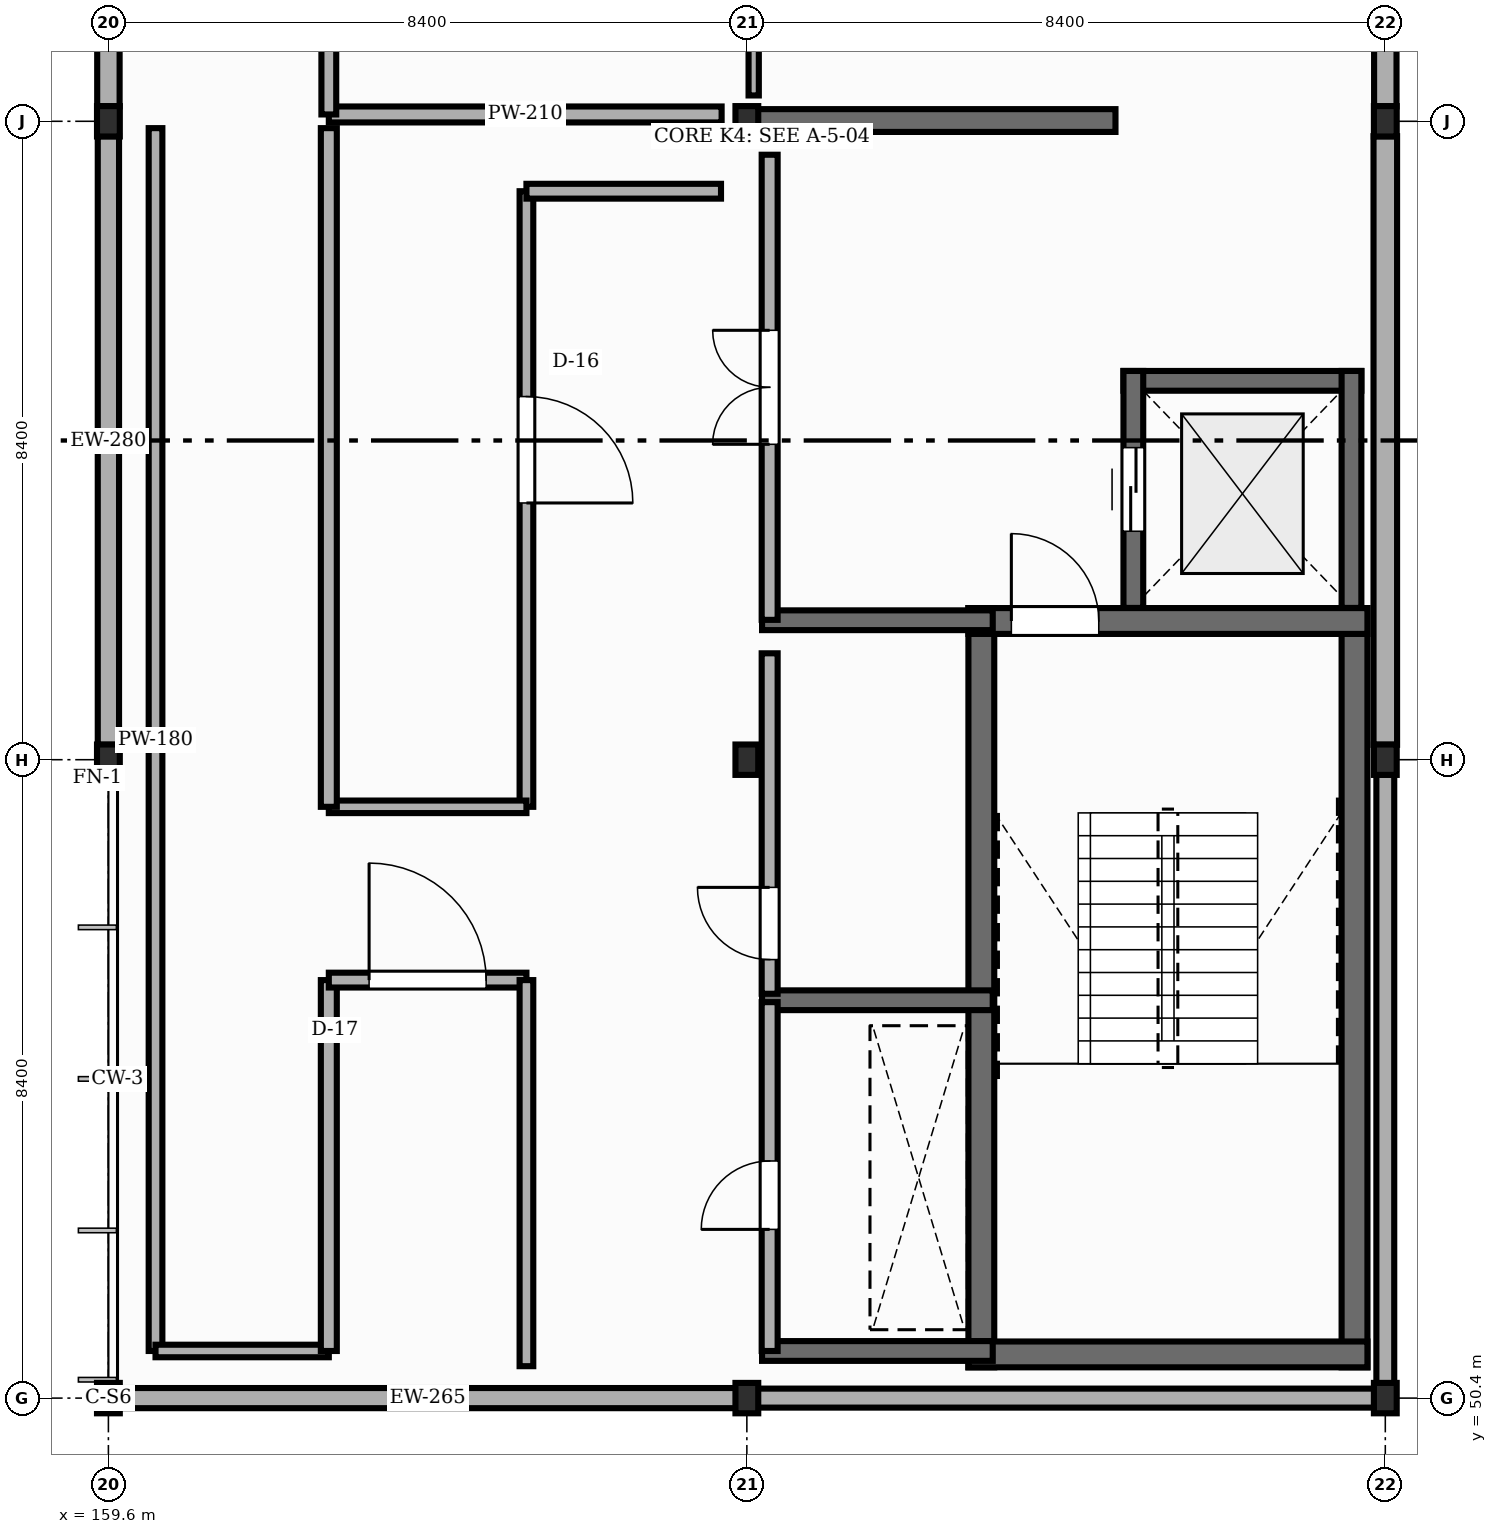
"""IFC4 building model, lengths in metres.
Left out: names, types, materials, properties, quantities, classifications, styles, units other than length and angle.
Written with IfcOpenShell. Run it as: python <this file> out.ifc"""

import sys

from ifc_helpers import new_model, si_unit, direction, frame, frame_2d, origin, origin_2d, place, context, subcontext, project, spatial, rectangle, i_section, extrude, element, fill, save


model = new_model("IFC4")
c1 = context("Model", 3, precision=1e-05, world=origin(), true_north=direction((0.0, 1.0)))
c2 = subcontext(c1, "Body", "Model", "MODEL_VIEW")
j1 = project(units=[si_unit("LENGTHUNIT", "METRE"), si_unit("PLANEANGLEUNIT", "RADIAN")], contexts=[c1])
p1 = place(None, origin())
s1 = spatial("IfcSite", under=j1, at=p1, CompositionType="ELEMENT")
p2 = place(p1, origin())
s2 = spatial("IfcBuilding", under=s1, at=p2, CompositionType="ELEMENT")
p3 = place(p2, frame((0.0, 0.0, 13.95)))
s3 = spatial("IfcBuildingStorey", under=s2, at=p3, CompositionType="ELEMENT", Elevation=13.95)
for number, where, z_axis, x_axis in (
    (1, (159.6, 50.4, 0.0), (0.0, 0.0, 1.0), (1.0, 0.0, 0.0)),
    (2, (159.6, 58.8, 0.0), (0.0, 0.0, 1.0), (1.0, 0.0, 0.0)),
    (3, (159.6, 67.2, 0.0), (0.0, 0.0, 1.0), (1.0, 0.0, 0.0)),
    (4, (168.0, 50.4, 0.0), (0.0, 0.0, 1.0), (1.0, 0.0, 0.0)),
    (5, (168.0, 58.8, 0.0), (0.0, 0.0, 1.0), (1.0, 0.0, 0.0)),
    (6, (168.0, 67.2, 0.0), (0.0, 0.0, 1.0), (1.0, 0.0, 0.0)),
    (7, (176.4, 50.4, 0.0), (0.0, 0.0, 1.0), (1.0, 0.0, 0.0)),
    (8, (176.4, 58.8, 0.0), (0.0, 0.0, 1.0), (1.0, 0.0, 0.0)),
    (9, (176.4, 67.2, 0.0), (0.0, 0.0, 1.0), (1.0, 0.0, 0.0)),
):
    element("IfcColumn", number, at=place(p3, frame(where, z_axis=z_axis, x_axis=x_axis)), inside=s3, PredefinedType="COLUMN", context=c2, shape_type="SweptSolid", body=[
        extrude(i_section(OverallWidth=0.3, OverallDepth=0.4, WebThickness=0.013, FlangeThickness=0.024, FilletRadius=0.027, at=origin_2d()), origin(), (0.0, 0.0, 1.0), 4.05),
    ])
p4 = place(p3, frame((159.6, 75.404, 0.0), z_axis=(0.0, 0.0, 1.0), x_axis=(0.0, -1.0, 0.0)))
e10 = element("IfcWall", 10, at=p4, inside=s3, PredefinedType="STANDARD", context=c2, shape_type="SweptSolid", body=[
    extrude(rectangle(XDim=8.008, YDim=0.295, at=frame_2d((4.004, 0.0))), origin(), (0.0, 0.0, 1.0), 3.577),
])
p5 = place(p3, frame((159.6, 67.004, 0.0), z_axis=(0.0, 0.0, 1.0), x_axis=(0.0, -1.0, 0.0)))
e11 = element("IfcWall", 11, at=p5, inside=s3, PredefinedType="STANDARD", context=c2, shape_type="SweptSolid", body=[
    extrude(rectangle(XDim=8.008, YDim=0.28, at=frame_2d((4.004, 0.0))), origin(), (0.0, 0.0, 1.0), 3.487),
])
p6 = place(p3, frame((159.608, 50.4, 0.0), z_axis=(0.0, 0.0, 1.0), x_axis=(1.0, 0.0, 0.0)))
e12 = element("IfcWall", 12, at=p6, inside=s3, PredefinedType="STANDARD", context=c2, shape_type="SweptSolid", body=[
    extrude(rectangle(XDim=8.384, YDim=0.265, at=frame_2d((4.192, 0.0))), origin(), (0.0, 0.0, 1.0), 3.517),
])
p7 = place(p3, frame((168.008, 50.4, 0.0), z_axis=(0.0, 0.0, 1.0), x_axis=(1.0, 0.0, 0.0)))
e13 = element("IfcWall", 13, at=p7, inside=s3, PredefinedType="STANDARD", context=c2, shape_type="SweptSolid", body=[
    extrude(rectangle(XDim=8.384, YDim=0.25, at=frame_2d((4.192, 0.0))), origin(), (0.0, 0.0, 1.0), 3.487),
])
p8 = place(p3, frame((176.4, 50.596, 0.0), z_axis=(0.0, 0.0, 1.0), x_axis=(0.0, 1.0, 0.0)))
e14 = element("IfcWall", 14, at=p8, inside=s3, PredefinedType="STANDARD", context=c2, shape_type="SweptSolid", body=[
    extrude(rectangle(XDim=8.008, YDim=0.235, at=frame_2d((4.004, 0.0))), origin(), (0.0, 0.0, 1.0), 3.577),
])
p9 = place(p3, frame((176.4, 58.996, 0.0), z_axis=(0.0, 0.0, 1.0), x_axis=(0.0, 1.0, 0.0)))
e15 = element("IfcWall", 15, at=p9, inside=s3, PredefinedType="STANDARD", context=c2, shape_type="SweptSolid", body=[
    extrude(rectangle(XDim=8.008, YDim=0.31, at=frame_2d((4.004, 0.0))), origin(), (0.0, 0.0, 1.0), 3.487),
])
p10 = place(p3, frame((176.4, 67.396, 0.0), z_axis=(0.0, 0.0, 1.0), x_axis=(0.0, 1.0, 0.0)))
e16 = element("IfcWall", 16, at=p10, inside=s3, PredefinedType="STANDARD", context=c2, shape_type="SweptSolid", body=[
    extrude(rectangle(XDim=8.008, YDim=0.295, at=frame_2d((4.004, 0.0))), origin(), (0.0, 0.0, 1.0), 3.577),
])
for number, where, z_axis, x_axis in (
    (17, (171.085, 50.805, 0.0), (0.0, 0.0, 1.0), (0.0, 1.0, 0.0)),
    (18, (175.995, 50.805, 0.0), (0.0, 0.0, 1.0), (0.0, 1.0, 0.0)),
):
    element("IfcWall", number, at=place(p3, frame(where, z_axis=z_axis, x_axis=x_axis)), inside=s3, PredefinedType="SHEAR", context=c2, shape_type="SweptSolid", body=[
        extrude(rectangle(XDim=9.99, YDim=0.34, at=frame_2d((4.995, 0.0))), origin(), (0.0, 0.0, 1.0), 3.85),
    ])
p11 = place(p3, frame((170.915, 50.975, 0.0), z_axis=(0.0, 0.0, 1.0), x_axis=(1.0, 0.0, 0.0)))
e19 = element("IfcWall", 19, at=p11, inside=s3, PredefinedType="SHEAR", context=c2, shape_type="SweptSolid", body=[
    extrude(rectangle(XDim=5.25, YDim=0.34, at=frame_2d((2.625, 0.0))), origin(), (0.0, 0.0, 1.0), 3.85),
])
p12 = place(p3, frame((170.915, 60.625, 0.0), z_axis=(0.0, 0.0, 1.0), x_axis=(1.0, 0.0, 0.0)))
e20 = element("IfcWall", 20, at=p12, inside=s3, PredefinedType="SHEAR", context=c2, shape_type="SweptSolid", body=[
    extrude(rectangle(XDim=5.25, YDim=0.34, at=frame_2d((2.625, 0.0))), origin(), (0.0, 0.0, 1.0), 3.85),
])
p13 = place(p12, frame((0.565, 0.0, 0.0)))
e21 = element("IfcOpeningElement", 21, at=p13, cuts=e20, PredefinedType="OPENING", context=c2, shape_type="SweptSolid", body=[
    extrude(rectangle(XDim=1.15, YDim=2.15, at=frame_2d((0.575, 1.075))), frame((0.0, 0.18, 0.0), z_axis=(0.0, -1.0, 0.0), x_axis=(1.0, 0.0, 0.0)), (0.0, 0.0, 1.0), 0.36),
])
p14 = place(p3, frame((172.955, 63.785, 0.0), z_axis=(0.0, 0.0, 1.0), x_axis=(1.0, 0.0, 0.0)))
e22 = element("IfcWall", 22, at=p14, inside=s3, PredefinedType="SHEAR", context=c2, shape_type="SweptSolid", body=[
    extrude(rectangle(XDim=3.13, YDim=0.26, at=frame_2d((1.565, 0.0))), origin(), (0.0, 0.0, 1.0), 3.85),
])
p15 = place(p3, frame((175.955, 60.797, 0.0), z_axis=(0.0, 0.0, 1.0), x_axis=(0.0, 1.0, 0.0)))
e23 = element("IfcWall", 23, at=p15, inside=s3, PredefinedType="SHEAR", context=c2, shape_type="SweptSolid", body=[
    extrude(rectangle(XDim=3.118, YDim=0.26, at=frame_2d((1.559, 0.0))), origin(), (0.0, 0.0, 1.0), 3.85),
])
p16 = place(p3, frame((173.085, 60.797, 0.0), z_axis=(0.0, 0.0, 1.0), x_axis=(0.0, 1.0, 0.0)))
e24 = element("IfcWall", 24, at=p16, inside=s3, PredefinedType="SHEAR", context=c2, shape_type="SweptSolid", body=[
    extrude(rectangle(XDim=3.118, YDim=0.26, at=frame_2d((1.559, 0.0))), origin(), (0.0, 0.0, 1.0), 3.85),
])
p17 = place(p16, frame((1.009, 0.0, 0.0)))
e25 = element("IfcOpeningElement", 25, at=p17, cuts=e24, PredefinedType="OPENING", context=c2, shape_type="SweptSolid", body=[
    extrude(rectangle(XDim=1.1, YDim=2.15, at=frame_2d((0.55, 1.075))), frame((0.0, 0.14, 0.0), z_axis=(0.0, -1.0, 0.0), x_axis=(1.0, 0.0, 0.0)), (0.0, 0.0, 1.0), 0.28),
])
for number, where, z_axis, x_axis in (
    (26, (168.2, 51.02, 0.0), (0.0, 0.0, 1.0), (1.0, 0.0, 0.0)),
    (27, (168.2, 55.635, 0.0), (0.0, 0.0, 1.0), (1.0, 0.0, 0.0)),
    (28, (168.2, 60.635, 0.0), (0.0, 0.0, 1.0), (1.0, 0.0, 0.0)),
):
    element("IfcWall", number, at=place(p3, frame(where, z_axis=z_axis, x_axis=x_axis)), inside=s3, PredefinedType="SHEAR", context=c2, shape_type="SweptSolid", body=[
        extrude(rectangle(XDim=3.035, YDim=0.26, at=frame_2d((1.518, 0.0))), origin(), (0.0, 0.0, 1.0), 3.85),
    ])
p18 = place(p3, frame((167.98, 67.21, 0.0), z_axis=(0.0, 0.0, 1.0), x_axis=(1.0, 0.0, 0.0)))
e29 = element("IfcWall", 29, at=p18, inside=s3, PredefinedType="SHEAR", context=c2, shape_type="SweptSolid", body=[
    extrude(rectangle(XDim=4.87, YDim=0.3, at=frame_2d((2.435, 0.0))), origin(), (0.0, 0.0, 1.0), 3.85),
])
p19 = place(p3, frame((168.3, 51.02, 0.0), z_axis=(0.0, 0.0, 1.0), x_axis=(0.0, 1.0, 0.0)))
e30 = element("IfcWall", 30, at=p19, inside=s3, PredefinedType="STANDARD", context=c2, shape_type="SweptSolid", body=[
    extrude(rectangle(XDim=4.59, YDim=0.21, at=frame_2d((2.295, 0.0))), origin(), (0.0, 0.0, 1.0), 3.357),
])
p20 = place(p19, frame((1.6, 0.0, 0.0)))
e31 = element("IfcOpeningElement", 31, at=p20, cuts=e30, PredefinedType="OPENING", context=c2, shape_type="SweptSolid", body=[
    extrude(rectangle(XDim=0.9, YDim=2.1, at=frame_2d((0.45, 1.05))), frame((0.0, 0.115, 0.0), z_axis=(0.0, -1.0, 0.0), x_axis=(1.0, 0.0, 0.0)), (0.0, 0.0, 1.0), 0.23),
])
p21 = place(p3, frame((168.3, 55.72, 0.0), z_axis=(0.0, 0.0, 1.0), x_axis=(0.0, 1.0, 0.0)))
e32 = element("IfcWall", 32, at=p21, inside=s3, PredefinedType="STANDARD", context=c2, shape_type="SweptSolid", body=[
    extrude(rectangle(XDim=4.48, YDim=0.21, at=frame_2d((2.24, 0.0))), origin(), (0.0, 0.0, 1.0), 3.357),
])
p22 = place(p21, frame((0.45, 0.0, 0.0)))
e33 = element("IfcOpeningElement", 33, at=p22, cuts=e32, PredefinedType="OPENING", context=c2, shape_type="SweptSolid", body=[
    extrude(rectangle(XDim=0.95, YDim=2.15, at=frame_2d((0.475, 1.075))), frame((0.0, 0.115, 0.0), z_axis=(0.0, -1.0, 0.0), x_axis=(1.0, 0.0, 0.0)), (0.0, 0.0, 1.0), 0.23),
])
p23 = place(p3, frame((168.3, 60.64, 0.0), z_axis=(0.0, 0.0, 1.0), x_axis=(0.0, 1.0, 0.0)))
e34 = element("IfcWall", 34, at=p23, inside=s3, PredefinedType="STANDARD", context=c2, shape_type="SweptSolid", body=[
    extrude(rectangle(XDim=6.12, YDim=0.21, at=frame_2d((3.06, 0.0))), origin(), (0.0, 0.0, 1.0), 3.447),
])
p24 = place(p23, frame((2.31, 0.0, 0.0)))
e35 = element("IfcOpeningElement", 35, at=p24, cuts=e34, PredefinedType="OPENING", context=c2, shape_type="SweptSolid", body=[
    extrude(rectangle(XDim=1.5, YDim=2.2, at=frame_2d((0.75, 1.1))), frame((0.0, 0.115, 0.0), z_axis=(0.0, -1.0, 0.0), x_axis=(1.0, 0.0, 0.0)), (0.0, 0.0, 1.0), 0.23),
])
p25 = place(p3, frame((168.09, 67.54, -0.004), z_axis=(0.0, 0.0, 1.0), x_axis=(0.0, 1.0, 0.0)))
e36 = element("IfcWall", 36, at=p25, inside=s3, PredefinedType="STANDARD", context=c2, shape_type="SweptSolid", body=[
    extrude(rectangle(XDim=7.886, YDim=0.135, at=frame_2d((3.943, 0.0))), origin(), (0.0, 0.0, 1.0), 3.501),
])
p26 = place(p3, frame((167.668, 67.29, -0.004), z_axis=(0.0, 0.0, 1.0), x_axis=(-1.0, 0.0, 0.0)))
e37 = element("IfcWall", 37, at=p26, inside=s3, PredefinedType="STANDARD", context=c2, shape_type="SweptSolid", body=[
    extrude(rectangle(XDim=5.168, YDim=0.21, at=frame_2d((2.584, 0.0))), origin(), (0.0, 0.0, 1.0), 3.251),
])
p27 = place(p3, frame((162.5, 67.29, -0.004), z_axis=(0.0, 0.0, 1.0), x_axis=(0.0, 1.0, 0.0)))
e38 = element("IfcWall", 38, at=p27, inside=s3, PredefinedType="STANDARD", context=c2, shape_type="SweptSolid", body=[
    extrude(rectangle(XDim=16.62, YDim=0.195, at=frame_2d((8.31, 0.0))), origin(), (0.0, 0.0, 1.0), 3.551),
])
p28 = place(p27, frame((3.515, 0.0, 0.0)))
e39 = element("IfcOpeningElement", 39, at=p28, cuts=e38, PredefinedType="OPENING", context=c2, shape_type="SweptSolid", body=[
    extrude(rectangle(XDim=1.28, YDim=2.22, at=frame_2d((0.64, 1.11))), frame((0.0, 0.107, 0.0), z_axis=(0.0, -1.0, 0.0), x_axis=(1.0, 0.0, 0.0)), (0.0, 0.0, 1.0), 0.215),
])
p29 = place(p3, frame((165.1, 66.28, -0.004), z_axis=(0.0, 0.0, 1.0), x_axis=(0.0, -1.0, 0.0)))
e40 = element("IfcWall", 40, at=p29, inside=s3, PredefinedType="STANDARD", context=c2, shape_type="SweptSolid", body=[
    extrude(rectangle(XDim=8.1, YDim=0.18, at=frame_2d((4.05, 0.0))), origin(), (0.0, 0.0, 1.0), 3.611),
])
p30 = place(p29, frame((2.702, 0.0, 0.0)))
e41 = element("IfcOpeningElement", 41, at=p30, cuts=e40, PredefinedType="OPENING", context=c2, shape_type="SweptSolid", body=[
    extrude(rectangle(XDim=1.4, YDim=2.14, at=frame_2d((0.7, 1.07))), frame((0.0, 0.1, 0.0), z_axis=(0.0, -1.0, 0.0), x_axis=(1.0, 0.0, 0.0)), (0.0, 0.0, 1.0), 0.2),
])
p31 = place(p3, frame((165.1, 58.18, -0.004), z_axis=(0.0, 0.0, 1.0), x_axis=(-1.0, 0.0, 0.0)))
e42 = element("IfcWall", 42, at=p31, inside=s3, PredefinedType="STANDARD", context=c2, shape_type="SweptSolid", body=[
    extrude(rectangle(XDim=2.6, YDim=0.165, at=frame_2d((1.3, 0.0))), origin(), (0.0, 0.0, 1.0), 3.854),
])
p32 = place(p3, frame((162.5, 58.18, -0.004), z_axis=(0.0, 0.0, 1.0), x_axis=(0.0, 1.0, 0.0)))
e43 = element("IfcWall", 43, at=p32, inside=s3, PredefinedType="STANDARD", context=c2, shape_type="SweptSolid", body=[
    extrude(rectangle(XDim=8.93, YDim=0.21, at=frame_2d((4.465, 0.0))), origin(), (0.0, 0.0, 1.0), 3.611),
])
p33 = place(p3, frame((167.66, 66.28, -0.004), z_axis=(0.0, 0.0, 1.0), x_axis=(-1.0, 0.0, 0.0)))
e44 = element("IfcWall", 44, at=p33, inside=s3, PredefinedType="STANDARD", context=c2, shape_type="SweptSolid", body=[
    extrude(rectangle(XDim=2.56, YDim=0.195, at=frame_2d((1.28, 0.0))), origin(), (0.0, 0.0, 1.0), 3.854),
])
p34 = place(p3, frame((160.22, 67.11, -0.004), z_axis=(0.0, 0.0, 1.0), x_axis=(0.0, -1.0, 0.0)))
e45 = element("IfcWall", 45, at=p34, inside=s3, PredefinedType="STANDARD", context=c2, shape_type="SweptSolid", body=[
    extrude(rectangle(XDim=16.09, YDim=0.18, at=frame_2d((8.045, 0.0))), origin(), (0.0, 0.0, 1.0), 3.854),
])
p35 = place(p3, frame((160.22, 51.02, -0.004), z_axis=(0.0, 0.0, 1.0), x_axis=(1.0, 0.0, 0.0)))
e46 = element("IfcWall", 46, at=p35, inside=s3, PredefinedType="STANDARD", context=c2, shape_type="SweptSolid", body=[
    extrude(rectangle(XDim=2.28, YDim=0.165, at=frame_2d((1.14, 0.0))), origin(), (0.0, 0.0, 1.0), 3.854),
])
p36 = place(p3, frame((162.5, 51.02, -0.004), z_axis=(0.0, 0.0, 1.0), x_axis=(0.0, 1.0, 0.0)))
e47 = element("IfcWall", 47, at=p36, inside=s3, PredefinedType="STANDARD", context=c2, shape_type="SweptSolid", body=[
    extrude(rectangle(XDim=4.88, YDim=0.21, at=frame_2d((2.44, 0.0))), origin(), (0.0, 0.0, 1.0), 3.611),
])
p37 = place(p3, frame((162.5, 55.9, -0.004), z_axis=(0.0, 0.0, 1.0), x_axis=(1.0, 0.0, 0.0)))
e48 = element("IfcWall", 48, at=p37, inside=s3, PredefinedType="STANDARD", context=c2, shape_type="SweptSolid", body=[
    extrude(rectangle(XDim=2.6, YDim=0.195, at=frame_2d((1.3, 0.0))), origin(), (0.0, 0.0, 1.0), 3.854),
])
p38 = place(p37, frame((0.53, 0.0, 0.0)))
e49 = element("IfcOpeningElement", 49, at=p38, cuts=e48, PredefinedType="OPENING", context=c2, shape_type="SweptSolid", body=[
    extrude(rectangle(XDim=1.54, YDim=2.14, at=frame_2d((0.77, 1.07))), frame((0.0, 0.107, 0.0), z_axis=(0.0, -1.0, 0.0), x_axis=(1.0, 0.0, 0.0)), (0.0, 0.0, 1.0), 0.215),
])
p39 = place(p3, frame((165.1, 55.9, -0.004), z_axis=(0.0, 0.0, 1.0), x_axis=(0.0, -1.0, 0.0)))
e50 = element("IfcWall", 50, at=p39, inside=s3, PredefinedType="STANDARD", context=c2, shape_type="SweptSolid", body=[
    extrude(rectangle(XDim=5.08, YDim=0.18, at=frame_2d((2.54, 0.0))), origin(), (0.0, 0.0, 1.0), 3.611),
])
p40 = place(p13, origin())
e51 = element("IfcDoor", 51, at=p40, inside=s3, OperationType="SINGLE_SWING_LEFT", PredefinedType="DOOR", context=c2, shape_type="SweptSolid", body=[
    extrude(rectangle(XDim=1.15, YDim=2.15, at=frame_2d((0.575, 1.075))), frame((0.0, 0.025, 0.0), z_axis=(0.0, -1.0, 0.0), x_axis=(1.0, 0.0, 0.0)), (0.0, 0.0, 1.0), 0.05),
])
fill(e21, e51)
p41 = place(p17, origin())
e52 = element("IfcDoor", 52, at=p41, inside=s3, OperationType="DOUBLE_DOOR_SLIDING", PredefinedType="DOOR", context=c2, shape_type="SweptSolid", body=[
    extrude(rectangle(XDim=1.1, YDim=2.15, at=frame_2d((0.55, 1.075))), frame((0.0, 0.025, 0.0), z_axis=(0.0, -1.0, 0.0), x_axis=(1.0, 0.0, 0.0)), (0.0, 0.0, 1.0), 0.05),
])
fill(e25, e52)
p42 = place(p20, origin())
e53 = element("IfcDoor", 53, at=p42, inside=s3, OperationType="SINGLE_SWING_LEFT", PredefinedType="DOOR", context=c2, shape_type="SweptSolid", body=[
    extrude(rectangle(XDim=0.9, YDim=2.1, at=frame_2d((0.45, 1.05))), frame((0.0, 0.025, 0.0), z_axis=(0.0, -1.0, 0.0), x_axis=(1.0, 0.0, 0.0)), (0.0, 0.0, 1.0), 0.05),
])
fill(e31, e53)
p43 = place(p22, origin())
e54 = element("IfcDoor", 54, at=p43, inside=s3, OperationType="SINGLE_SWING_RIGHT", PredefinedType="DOOR", context=c2, shape_type="SweptSolid", body=[
    extrude(rectangle(XDim=0.95, YDim=2.15, at=frame_2d((0.475, 1.075))), frame((0.0, 0.025, 0.0), z_axis=(0.0, -1.0, 0.0), x_axis=(1.0, 0.0, 0.0)), (0.0, 0.0, 1.0), 0.05),
])
fill(e33, e54)
p44 = place(p24, origin())
e55 = element("IfcDoor", 55, at=p44, inside=s3, OperationType="DOUBLE_DOOR_SINGLE_SWING", PredefinedType="DOOR", context=c2, shape_type="SweptSolid", body=[
    extrude(rectangle(XDim=1.5, YDim=2.2, at=frame_2d((0.75, 1.1))), frame((0.0, 0.025, 0.0), z_axis=(0.0, -1.0, 0.0), x_axis=(1.0, 0.0, 0.0)), (0.0, 0.0, 1.0), 0.05),
])
fill(e35, e55)
p45 = place(p30, origin())
e56 = element("IfcDoor", 56, at=p45, inside=s3, OperationType="SINGLE_SWING_RIGHT", PredefinedType="DOOR", context=c2, shape_type="SweptSolid", body=[
    extrude(rectangle(XDim=1.4, YDim=2.14, at=frame_2d((0.7, 1.07))), frame((0.0, 0.025, 0.0), z_axis=(0.0, -1.0, 0.0), x_axis=(1.0, 0.0, 0.0)), (0.0, 0.0, 1.0), 0.05),
])
fill(e41, e56)
p46 = place(p38, origin())
e57 = element("IfcDoor", 57, at=p46, inside=s3, OperationType="SINGLE_SWING_LEFT", PredefinedType="DOOR", context=c2, shape_type="SweptSolid", body=[
    extrude(rectangle(XDim=1.54, YDim=2.14, at=frame_2d((0.77, 1.07))), frame((0.0, 0.025, 0.0), z_axis=(0.0, -1.0, 0.0), x_axis=(1.0, 0.0, 0.0)), (0.0, 0.0, 1.0), 0.05),
])
fill(e49, e57)
save(model, sys.argv[1])
